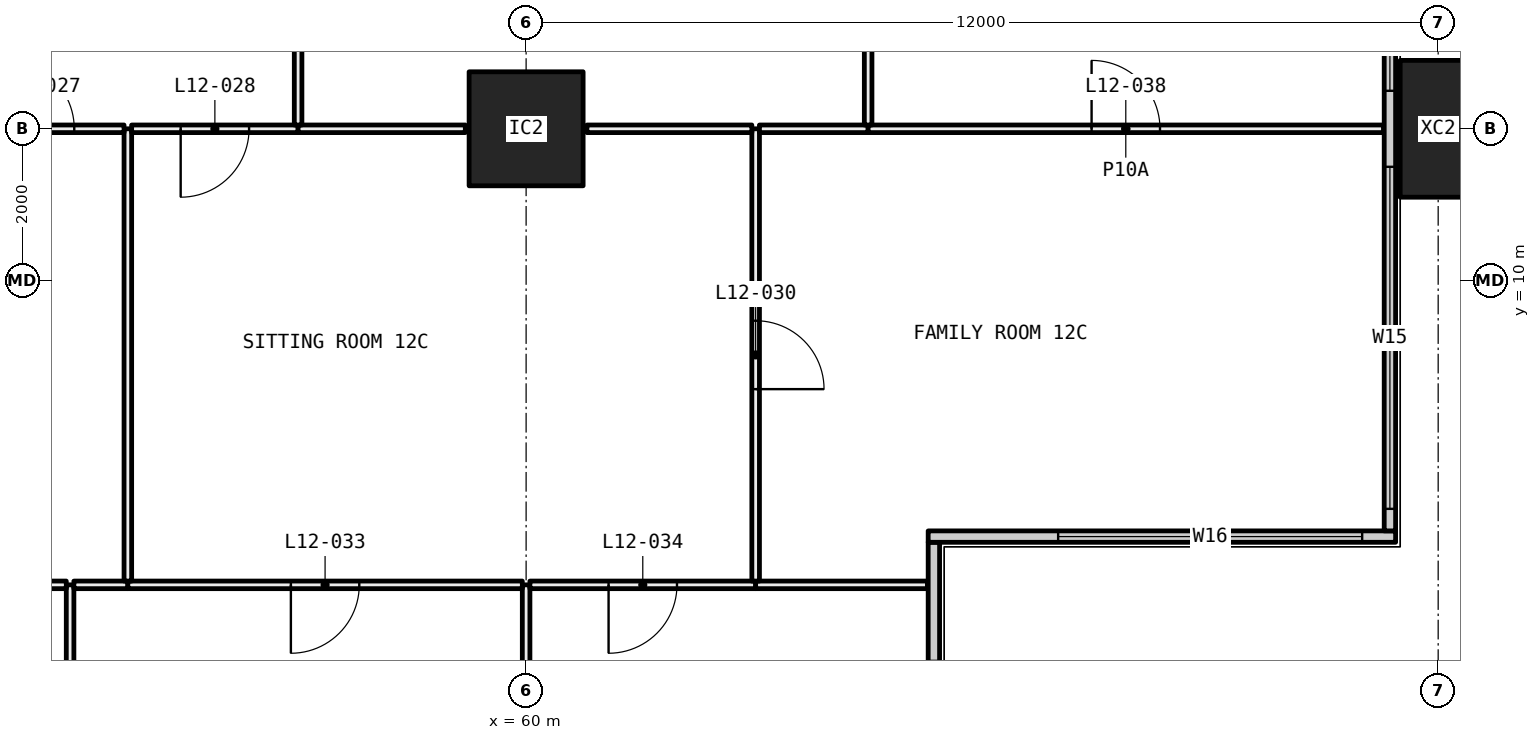
"""IFC4 building model, lengths in metres.
Left out: names, types, materials, properties, quantities, classifications, styles, units other than length and angle.
Written with IfcOpenShell. Run it as: python <this file> out.ifc"""

import sys

from ifc_helpers import new_model, si_unit, direction, frame, frame_2d, origin, origin_2d, place, context, subcontext, project, spatial, rectangle, hollow_rectangle, extrude, element, fill, save


model = new_model("IFC4")
c1 = context("Model", 3, precision=1e-05, world=origin(), true_north=direction((0.0, 1.0)))
c2 = subcontext(c1, "Body", "Model", "MODEL_VIEW")
j1 = project(units=[si_unit("LENGTHUNIT", "METRE"), si_unit("PLANEANGLEUNIT", "RADIAN")], contexts=[c1])
p1 = place(None, origin())
s1 = spatial("IfcSite", under=j1, at=p1, CompositionType="ELEMENT")
p2 = place(p1, origin())
s2 = spatial("IfcBuilding", under=s1, at=p2, CompositionType="ELEMENT")
p3 = place(p2, frame((0.0, 0.0, 54.15)))
s3 = spatial("IfcBuildingStorey", under=s2, at=p3, CompositionType="ELEMENT", Elevation=54.15)
p4 = place(p3, frame((60.0, 12.0, 0.0), z_axis=(0.0, 0.0, 1.0), x_axis=(1.0, 0.0, 0.0)))
e1 = element("IfcColumn", 1, at=p4, inside=s3, PredefinedType="COLUMN", context=c2, shape_type="SweptSolid", body=[
    extrude(hollow_rectangle(XDim=1.5, YDim=1.5, WallThickness=0.065, at=origin_2d()), origin(), (0.0, 0.0, 1.0), 3.05),
])
p5 = place(p3, frame((72.0, 12.0, -0.4), z_axis=(0.0, 0.0, 1.0), x_axis=(0.0, 1.0, 0.0)))
e2 = element("IfcColumn", 2, at=p5, inside=s3, PredefinedType="COLUMN", context=c2, shape_type="SweptSolid", body=[
    extrude(hollow_rectangle(XDim=1.8, YDim=1.0, WallThickness=0.07, at=origin_2d()), origin(), (0.0, 0.0, 1.0), 3.45),
])
p6 = place(p3, frame((65.365, 0.71, 0.0), z_axis=(0.0, 0.0, 1.0), x_axis=(0.0, 1.0, 0.0)))
e3 = element("IfcWall", 3, at=p6, inside=s3, PredefinedType="ELEMENTEDWALL", context=c2, shape_type="SweptSolid", body=[
    extrude(rectangle(XDim=5.85, YDim=0.15, at=frame_2d((2.925, 0.0))), origin(), (0.0, 0.0, 1.0), 3.05),
])
p7 = place(p6, frame((0.29, 0.0, 0.45)))
e4 = element("IfcOpeningElement", 4, at=p7, cuts=e3, PredefinedType="OPENING", context=c2, shape_type="SweptSolid", body=[
    extrude(rectangle(XDim=4.0, YDim=2.55, at=frame_2d((2.0, 1.275))), frame((0.0, 0.085, 0.0), z_axis=(0.0, -1.0, 0.0), x_axis=(1.0, 0.0, 0.0)), (0.0, 0.0, 1.0), 0.17),
])
p8 = place(p3, frame((65.29, 6.635, 0.0), z_axis=(0.0, 0.0, 1.0), x_axis=(1.0, 0.0, 0.0)))
e5 = element("IfcWall", 5, at=p8, inside=s3, PredefinedType="ELEMENTEDWALL", context=c2, shape_type="SweptSolid", body=[
    extrude(rectangle(XDim=6.15, YDim=0.15, at=frame_2d((3.075, 0.0))), origin(), (0.0, 0.0, 1.0), 3.05),
])
p9 = place(p8, frame((1.71, 0.0, 0.45)))
e6 = element("IfcOpeningElement", 6, at=p9, cuts=e5, PredefinedType="OPENING", context=c2, shape_type="SweptSolid", body=[
    extrude(rectangle(XDim=4.0, YDim=2.55, at=frame_2d((2.0, 1.275))), frame((0.0, 0.085, 0.0), z_axis=(0.0, -1.0, 0.0), x_axis=(1.0, 0.0, 0.0)), (0.0, 0.0, 1.0), 0.17),
])
p10 = place(p3, frame((71.365, 6.71, 0.0), z_axis=(0.0, 0.0, 1.0), x_axis=(0.0, 1.0, 0.0)))
e7 = element("IfcWall", 7, at=p10, inside=s3, PredefinedType="ELEMENTEDWALL", context=c2, shape_type="SweptSolid", body=[
    extrude(rectangle(XDim=34.58, YDim=0.15, at=frame_2d((17.29, 0.0))), origin(), (0.0, 0.0, 1.0), 3.05),
])
p11 = place(p10, frame((0.29, 0.0, 0.45)))
e8 = element("IfcOpeningElement", 8, at=p11, cuts=e7, PredefinedType="OPENING", context=c2, shape_type="SweptSolid", body=[
    extrude(rectangle(XDim=4.5, YDim=2.55, at=frame_2d((2.25, 1.275))), frame((0.0, 0.085, 0.0), z_axis=(0.0, -1.0, 0.0), x_axis=(1.0, 0.0, 0.0)), (0.0, 0.0, 1.0), 0.17),
])
p12 = place(p10, frame((5.79, 0.0, 0.45)))
e9 = element("IfcOpeningElement", 9, at=p12, cuts=e7, PredefinedType="OPENING", context=c2, shape_type="SweptSolid", body=[
    extrude(rectangle(XDim=1.25, YDim=2.55, at=frame_2d((0.625, 1.275))), frame((0.0, 0.085, 0.0), z_axis=(0.0, -1.0, 0.0), x_axis=(1.0, 0.0, 0.0)), (0.0, 0.0, 1.0), 0.17),
])
p13 = place(p10, frame((9.79, 0.0, 0.45)))
e10 = element("IfcOpeningElement", 10, at=p13, cuts=e7, PredefinedType="OPENING", context=c2, shape_type="SweptSolid", body=[
    extrude(rectangle(XDim=1.0, YDim=2.55, at=frame_2d((0.5, 1.275))), frame((0.0, 0.085, 0.0), z_axis=(0.0, -1.0, 0.0), x_axis=(1.0, 0.0, 0.0)), (0.0, 0.0, 1.0), 0.17),
])
p14 = place(p10, frame((11.79, 0.0, 0.45)))
e11 = element("IfcOpeningElement", 11, at=p14, cuts=e7, PredefinedType="OPENING", context=c2, shape_type="SweptSolid", body=[
    extrude(rectangle(XDim=1.0, YDim=2.55, at=frame_2d((0.5, 1.275))), frame((0.0, 0.085, 0.0), z_axis=(0.0, -1.0, 0.0), x_axis=(1.0, 0.0, 0.0)), (0.0, 0.0, 1.0), 0.17),
])
p15 = place(p10, frame((15.54, 0.0, 0.45)))
e12 = element("IfcOpeningElement", 12, at=p15, cuts=e7, PredefinedType="OPENING", context=c2, shape_type="SweptSolid", body=[
    extrude(rectangle(XDim=1.25, YDim=2.55, at=frame_2d((0.625, 1.275))), frame((0.0, 0.085, 0.0), z_axis=(0.0, -1.0, 0.0), x_axis=(1.0, 0.0, 0.0)), (0.0, 0.0, 1.0), 0.17),
])
p16 = place(p10, frame((17.79, 0.0, 0.45)))
e13 = element("IfcOpeningElement", 13, at=p16, cuts=e7, PredefinedType="OPENING", context=c2, shape_type="SweptSolid", body=[
    extrude(rectangle(XDim=1.25, YDim=2.55, at=frame_2d((0.625, 1.275))), frame((0.0, 0.085, 0.0), z_axis=(0.0, -1.0, 0.0), x_axis=(1.0, 0.0, 0.0)), (0.0, 0.0, 1.0), 0.17),
])
p17 = place(p10, frame((21.79, 0.0, 0.45)))
e14 = element("IfcOpeningElement", 14, at=p17, cuts=e7, PredefinedType="OPENING", context=c2, shape_type="SweptSolid", body=[
    extrude(rectangle(XDim=1.0, YDim=2.55, at=frame_2d((0.5, 1.275))), frame((0.0, 0.085, 0.0), z_axis=(0.0, -1.0, 0.0), x_axis=(1.0, 0.0, 0.0)), (0.0, 0.0, 1.0), 0.17),
])
p18 = place(p10, frame((23.79, 0.0, 0.45)))
e15 = element("IfcOpeningElement", 15, at=p18, cuts=e7, PredefinedType="OPENING", context=c2, shape_type="SweptSolid", body=[
    extrude(rectangle(XDim=1.0, YDim=2.55, at=frame_2d((0.5, 1.275))), frame((0.0, 0.085, 0.0), z_axis=(0.0, -1.0, 0.0), x_axis=(1.0, 0.0, 0.0)), (0.0, 0.0, 1.0), 0.17),
])
p19 = place(p10, frame((27.54, 0.0, 0.45)))
e16 = element("IfcOpeningElement", 16, at=p19, cuts=e7, PredefinedType="OPENING", context=c2, shape_type="SweptSolid", body=[
    extrude(rectangle(XDim=1.25, YDim=2.55, at=frame_2d((0.625, 1.275))), frame((0.0, 0.085, 0.0), z_axis=(0.0, -1.0, 0.0), x_axis=(1.0, 0.0, 0.0)), (0.0, 0.0, 1.0), 0.17),
])
p20 = place(p10, frame((29.79, 0.0, 0.45)))
e17 = element("IfcOpeningElement", 17, at=p20, cuts=e7, PredefinedType="OPENING", context=c2, shape_type="SweptSolid", body=[
    extrude(rectangle(XDim=4.5, YDim=2.55, at=frame_2d((2.25, 1.275))), frame((0.0, 0.085, 0.0), z_axis=(0.0, -1.0, 0.0), x_axis=(1.0, 0.0, 0.0)), (0.0, 0.0, 1.0), 0.17),
])
p21 = place(p3, frame((54.0, 0.72, 0.0), z_axis=(0.0, 0.0, 1.0), x_axis=(0.0, 1.0, 0.0)))
e18 = element("IfcWall", 18, at=p21, inside=s3, PredefinedType="PARTITIONING", context=c2, shape_type="SweptSolid", body=[
    extrude(rectangle(XDim=5.28, YDim=0.1, at=frame_2d((2.64, 0.0))), origin(), (0.0, 0.0, 1.0), 3.05),
])
p22 = place(p3, frame((53.95, 6.0, 0.0), z_axis=(0.0, 0.0, 1.0), x_axis=(-1.0, 0.0, 0.0)))
e19 = element("IfcWall", 19, at=p22, inside=s3, PredefinedType="PARTITIONING", context=c2, shape_type="SweptSolid", body=[
    extrude(rectangle(XDim=5.9, YDim=0.1, at=frame_2d((2.95, 0.0))), origin(), (0.0, 0.0, 1.0), 2.45),
])
p23 = place(p22, frame((2.5, 0.0, 0.0)))
e20 = element("IfcOpeningElement", 20, at=p23, cuts=e19, PredefinedType="OPENING", context=c2, shape_type="SweptSolid", body=[
    extrude(rectangle(XDim=0.9, YDim=2.1, at=frame_2d((0.45, 1.05))), frame((0.0, 0.06, 0.0), z_axis=(0.0, -1.0, 0.0), x_axis=(1.0, 0.0, 0.0)), (0.0, 0.0, 1.0), 0.12),
])
p24 = place(p3, frame((60.0, 0.72, 0.0), z_axis=(0.0, 0.0, 1.0), x_axis=(0.0, 1.0, 0.0)))
e21 = element("IfcWall", 21, at=p24, inside=s3, PredefinedType="PARTITIONING", context=c2, shape_type="SweptSolid", body=[
    extrude(rectangle(XDim=5.28, YDim=0.1, at=frame_2d((2.64, 0.0))), origin(), (0.0, 0.0, 1.0), 2.45),
])
p25 = place(p3, frame((54.76, 6.0, 0.0), z_axis=(0.0, 0.0, 1.0), x_axis=(-1.0, 0.0, 0.0)))
e22 = element("IfcWall", 22, at=p25, inside=s3, PredefinedType="PARTITIONING", context=c2, shape_type="SweptSolid", body=[
    extrude(rectangle(XDim=0.71, YDim=0.1, at=frame_2d((0.355, 0.0))), origin(), (0.0, 0.0, 1.0), 3.05),
])
p26 = place(p3, frame((59.95, 6.0, 0.0), z_axis=(0.0, 0.0, 1.0), x_axis=(-1.0, 0.0, 0.0)))
e23 = element("IfcWall", 23, at=p26, inside=s3, PredefinedType="PARTITIONING", context=c2, shape_type="SweptSolid", body=[
    extrude(rectangle(XDim=5.19, YDim=0.1, at=frame_2d((2.595, 0.0))), origin(), (0.0, 0.0, 1.0), 2.45),
])
p27 = place(p26, frame((2.145, 0.0, 0.0)))
e24 = element("IfcOpeningElement", 24, at=p27, cuts=e23, PredefinedType="OPENING", context=c2, shape_type="SweptSolid", body=[
    extrude(rectangle(XDim=0.9, YDim=2.1, at=frame_2d((0.45, 1.05))), frame((0.0, 0.06, 0.0), z_axis=(0.0, -1.0, 0.0), x_axis=(1.0, 0.0, 0.0)), (0.0, 0.0, 1.0), 0.12),
])
p28 = place(p3, frame((63.02, 6.0, 0.0), z_axis=(0.0, 0.0, 1.0), x_axis=(-1.0, 0.0, 0.0)))
e25 = element("IfcWall", 25, at=p28, inside=s3, PredefinedType="PARTITIONING", context=c2, shape_type="SweptSolid", body=[
    extrude(rectangle(XDim=2.97, YDim=0.1, at=frame_2d((1.485, 0.0))), origin(), (0.0, 0.0, 1.0), 2.45),
])
p29 = place(p28, frame((1.035, 0.0, 0.0)))
e26 = element("IfcOpeningElement", 26, at=p29, cuts=e25, PredefinedType="OPENING", context=c2, shape_type="SweptSolid", body=[
    extrude(rectangle(XDim=0.9, YDim=2.1, at=frame_2d((0.45, 1.05))), frame((0.0, 0.06, 0.0), z_axis=(0.0, -1.0, 0.0), x_axis=(1.0, 0.0, 0.0)), (0.0, 0.0, 1.0), 0.12),
])
p30 = place(p3, frame((65.28, 6.0, 0.0), z_axis=(0.0, 0.0, 1.0), x_axis=(-1.0, 0.0, 0.0)))
e27 = element("IfcWall", 27, at=p30, inside=s3, PredefinedType="PARTITIONING", context=c2, shape_type="SweptSolid", body=[
    extrude(rectangle(XDim=2.26, YDim=0.1, at=frame_2d((1.13, 0.0))), origin(), (0.0, 0.0, 1.0), 3.05),
])
p31 = place(p3, frame((54.76, 6.05, 0.0), z_axis=(0.0, 0.0, 1.0), x_axis=(0.0, 1.0, 0.0)))
e28 = element("IfcWall", 28, at=p31, inside=s3, PredefinedType="PARTITIONING", context=c2, shape_type="SweptSolid", body=[
    extrude(rectangle(XDim=5.95, YDim=0.1, at=frame_2d((2.975, 0.0))), origin(), (0.0, 0.0, 1.0), 2.45),
])
p32 = place(p3, frame((54.71, 12.0, 0.0), z_axis=(0.0, 0.0, 1.0), x_axis=(-1.0, 0.0, 0.0)))
e29 = element("IfcWall", 29, at=p32, inside=s3, PredefinedType="PARTITIONING", context=c2, shape_type="SweptSolid", body=[
    extrude(rectangle(XDim=2.21, YDim=0.1, at=frame_2d((1.105, 0.0))), origin(), (0.0, 0.0, 1.0), 2.45),
])
p33 = place(p32, frame((0.655, 0.0, 0.0)))
e30 = element("IfcOpeningElement", 30, at=p33, cuts=e29, PredefinedType="OPENING", context=c2, shape_type="SweptSolid", body=[
    extrude(rectangle(XDim=0.9, YDim=2.1, at=frame_2d((0.45, 1.05))), frame((0.0, 0.06, 0.0), z_axis=(0.0, -1.0, 0.0), x_axis=(1.0, 0.0, 0.0)), (0.0, 0.0, 1.0), 0.12),
])
p34 = place(p3, frame((63.02, 6.05, 0.0), z_axis=(0.0, 0.0, 1.0), x_axis=(0.0, 1.0, 0.0)))
e31 = element("IfcWall", 31, at=p34, inside=s3, PredefinedType="PARTITIONING", context=c2, shape_type="SweptSolid", body=[
    extrude(rectangle(XDim=5.95, YDim=0.1, at=frame_2d((2.975, 0.0))), origin(), (0.0, 0.0, 1.0), 2.45),
])
p35 = place(p34, frame((2.525, 0.0, 0.0)))
e32 = element("IfcOpeningElement", 32, at=p35, cuts=e31, PredefinedType="OPENING", context=c2, shape_type="SweptSolid", body=[
    extrude(rectangle(XDim=0.9, YDim=2.1, at=frame_2d((0.45, 1.05))), frame((0.0, 0.06, 0.0), z_axis=(0.0, -1.0, 0.0), x_axis=(1.0, 0.0, 0.0)), (0.0, 0.0, 1.0), 0.12),
])
p36 = place(p3, frame((57.0, 12.0, 0.0), z_axis=(0.0, 0.0, 1.0), x_axis=(-1.0, 0.0, 0.0)))
e33 = element("IfcWall", 33, at=p36, inside=s3, PredefinedType="PARTITIONING", context=c2, shape_type="SweptSolid", body=[
    extrude(rectangle(XDim=2.19, YDim=0.1, at=frame_2d((1.095, 0.0))), origin(), (0.0, 0.0, 1.0), 2.45),
])
p37 = place(p36, frame((0.645, 0.0, 0.0)))
e34 = element("IfcOpeningElement", 34, at=p37, cuts=e33, PredefinedType="OPENING", context=c2, shape_type="SweptSolid", body=[
    extrude(rectangle(XDim=0.9, YDim=2.1, at=frame_2d((0.45, 1.05))), frame((0.0, 0.06, 0.0), z_axis=(0.0, -1.0, 0.0), x_axis=(1.0, 0.0, 0.0)), (0.0, 0.0, 1.0), 0.12),
])
p38 = place(p3, frame((59.2, 12.0, 0.0), z_axis=(0.0, 0.0, 1.0), x_axis=(-1.0, 0.0, 0.0)))
e35 = element("IfcWall", 35, at=p38, inside=s3, PredefinedType="PARTITIONING", context=c2, shape_type="SweptSolid", body=[
    extrude(rectangle(XDim=2.2, YDim=0.1, at=frame_2d((1.1, 0.0))), origin(), (0.0, 0.0, 1.0), 2.45),
])
p39 = place(p3, frame((62.97, 12.0, 0.0), z_axis=(0.0, 0.0, 1.0), x_axis=(-1.0, 0.0, 0.0)))
e36 = element("IfcWall", 36, at=p39, inside=s3, PredefinedType="PARTITIONING", context=c2, shape_type="SweptSolid", body=[
    extrude(rectangle(XDim=2.17, YDim=0.1, at=frame_2d((1.085, 0.0))), origin(), (0.0, 0.0, 1.0), 2.45),
])
p40 = place(p3, frame((64.5, 12.0, 0.0), z_axis=(0.0, 0.0, 1.0), x_axis=(-1.0, 0.0, 0.0)))
e37 = element("IfcWall", 37, at=p40, inside=s3, PredefinedType="PARTITIONING", context=c2, shape_type="SweptSolid", body=[
    extrude(rectangle(XDim=1.43, YDim=0.1, at=frame_2d((0.715, 0.0))), origin(), (0.0, 0.0, 1.0), 2.45),
])
p41 = place(p3, frame((71.28, 12.0, 0.0), z_axis=(0.0, 0.0, 1.0), x_axis=(-1.0, 0.0, 0.0)))
e38 = element("IfcWall", 38, at=p41, inside=s3, PredefinedType="PARTITIONING", context=c2, shape_type="SweptSolid", body=[
    extrude(rectangle(XDim=6.78, YDim=0.1, at=frame_2d((3.39, 0.0))), origin(), (0.0, 0.0, 1.0), 2.45),
])
p42 = place(p41, frame((2.94, 0.0, 0.0)))
e39 = element("IfcOpeningElement", 39, at=p42, cuts=e38, PredefinedType="OPENING", context=c2, shape_type="SweptSolid", body=[
    extrude(rectangle(XDim=0.9, YDim=2.1, at=frame_2d((0.45, 1.05))), frame((0.0, 0.06, 0.0), z_axis=(0.0, -1.0, 0.0), x_axis=(1.0, 0.0, 0.0)), (0.0, 0.0, 1.0), 0.12),
])
p43 = place(p3, frame((57.0, 12.05, 0.0), z_axis=(0.0, 0.0, 1.0), x_axis=(0.0, 1.0, 0.0)))
e40 = element("IfcWall", 40, at=p43, inside=s3, PredefinedType="PARTITIONING", context=c2, shape_type="SweptSolid", body=[
    extrude(rectangle(XDim=5.85, YDim=0.1, at=frame_2d((2.925, 0.0))), origin(), (0.0, 0.0, 1.0), 2.45),
])
p44 = place(p43, frame((2.475, 0.0, 0.0)))
e41 = element("IfcOpeningElement", 41, at=p44, cuts=e40, PredefinedType="OPENING", context=c2, shape_type="SweptSolid", body=[
    extrude(rectangle(XDim=0.9, YDim=2.1, at=frame_2d((0.45, 1.05))), frame((0.0, 0.06, 0.0), z_axis=(0.0, -1.0, 0.0), x_axis=(1.0, 0.0, 0.0)), (0.0, 0.0, 1.0), 0.12),
])
p45 = place(p3, frame((64.5, 12.05, 0.0), z_axis=(0.0, 0.0, 1.0), x_axis=(0.0, 1.0, 0.0)))
e42 = element("IfcWall", 42, at=p45, inside=s3, PredefinedType="PARTITIONING", context=c2, shape_type="SweptSolid", body=[
    extrude(rectangle(XDim=5.85, YDim=0.1, at=frame_2d((2.925, 0.0))), origin(), (0.0, 0.0, 1.0), 2.45),
])
p46 = place(p9, origin())
e43 = element("IfcWindow", 43, at=p46, inside=s3, PartitioningType="SINGLE_PANEL", PredefinedType="WINDOW", context=c2, shape_type="SweptSolid", body=[
    extrude(rectangle(XDim=4.0, YDim=2.55, at=frame_2d((2.0, 1.275))), frame((0.0, 0.03, 0.0), z_axis=(0.0, -1.0, 0.0), x_axis=(1.0, 0.0, 0.0)), (0.0, 0.0, 1.0), 0.06),
])
fill(e6, e43)
p47 = place(p11, origin())
e44 = element("IfcWindow", 44, at=p47, inside=s3, PartitioningType="SINGLE_PANEL", PredefinedType="WINDOW", context=c2, shape_type="SweptSolid", body=[
    extrude(rectangle(XDim=4.5, YDim=2.55, at=frame_2d((2.25, 1.275))), frame((0.0, 0.03, 0.0), z_axis=(0.0, -1.0, 0.0), x_axis=(1.0, 0.0, 0.0)), (0.0, 0.0, 1.0), 0.06),
])
fill(e8, e44)
p48 = place(p12, origin())
e45 = element("IfcWindow", 45, at=p48, inside=s3, PartitioningType="SINGLE_PANEL", PredefinedType="WINDOW", context=c2, shape_type="SweptSolid", body=[
    extrude(rectangle(XDim=1.25, YDim=2.55, at=frame_2d((0.625, 1.275))), frame((0.0, 0.03, 0.0), z_axis=(0.0, -1.0, 0.0), x_axis=(1.0, 0.0, 0.0)), (0.0, 0.0, 1.0), 0.06),
])
fill(e9, e45)
p49 = place(p33, frame((0.9, 0.0, 0.0), x_axis=(-1.0, 0.0, 0.0)))
e46 = element("IfcDoor", 46, at=p49, inside=s3, OperationType="SINGLE_SWING_RIGHT", PredefinedType="DOOR", context=c2, shape_type="SweptSolid", body=[
    extrude(rectangle(XDim=0.9, YDim=2.1, at=frame_2d((0.45, 1.05))), frame((0.0, 0.025, 0.0), z_axis=(0.0, -1.0, 0.0), x_axis=(1.0, 0.0, 0.0)), (0.0, 0.0, 1.0), 0.05),
])
fill(e30, e46)
p50 = place(p37, origin())
e47 = element("IfcDoor", 47, at=p50, inside=s3, OperationType="SINGLE_SWING_LEFT", PredefinedType="DOOR", context=c2, shape_type="SweptSolid", body=[
    extrude(rectangle(XDim=0.9, YDim=2.1, at=frame_2d((0.45, 1.05))), frame((0.0, 0.025, 0.0), z_axis=(0.0, -1.0, 0.0), x_axis=(1.0, 0.0, 0.0)), (0.0, 0.0, 1.0), 0.05),
])
fill(e34, e47)
p51 = place(p35, frame((0.9, 0.0, 0.0), x_axis=(-1.0, 0.0, 0.0)))
e48 = element("IfcDoor", 48, at=p51, inside=s3, OperationType="SINGLE_SWING_LEFT", PredefinedType="DOOR", context=c2, shape_type="SweptSolid", body=[
    extrude(rectangle(XDim=0.9, YDim=2.1, at=frame_2d((0.45, 1.05))), frame((0.0, 0.025, 0.0), z_axis=(0.0, -1.0, 0.0), x_axis=(1.0, 0.0, 0.0)), (0.0, 0.0, 1.0), 0.05),
])
fill(e32, e48)
p52 = place(p27, origin())
e49 = element("IfcDoor", 49, at=p52, inside=s3, OperationType="SINGLE_SWING_LEFT", PredefinedType="DOOR", context=c2, shape_type="SweptSolid", body=[
    extrude(rectangle(XDim=0.9, YDim=2.1, at=frame_2d((0.45, 1.05))), frame((0.0, 0.025, 0.0), z_axis=(0.0, -1.0, 0.0), x_axis=(1.0, 0.0, 0.0)), (0.0, 0.0, 1.0), 0.05),
])
fill(e24, e49)
p53 = place(p29, origin())
e50 = element("IfcDoor", 50, at=p53, inside=s3, OperationType="SINGLE_SWING_LEFT", PredefinedType="DOOR", context=c2, shape_type="SweptSolid", body=[
    extrude(rectangle(XDim=0.9, YDim=2.1, at=frame_2d((0.45, 1.05))), frame((0.0, 0.025, 0.0), z_axis=(0.0, -1.0, 0.0), x_axis=(1.0, 0.0, 0.0)), (0.0, 0.0, 1.0), 0.05),
])
fill(e26, e50)
p54 = place(p42, frame((0.9, 0.0, 0.0), x_axis=(-1.0, 0.0, 0.0)))
e51 = element("IfcDoor", 51, at=p54, inside=s3, OperationType="SINGLE_SWING_RIGHT", PredefinedType="DOOR", context=c2, shape_type="SweptSolid", body=[
    extrude(rectangle(XDim=0.9, YDim=2.1, at=frame_2d((0.45, 1.05))), frame((0.0, 0.025, 0.0), z_axis=(0.0, -1.0, 0.0), x_axis=(1.0, 0.0, 0.0)), (0.0, 0.0, 1.0), 0.05),
])
fill(e39, e51)
save(model, sys.argv[1])
